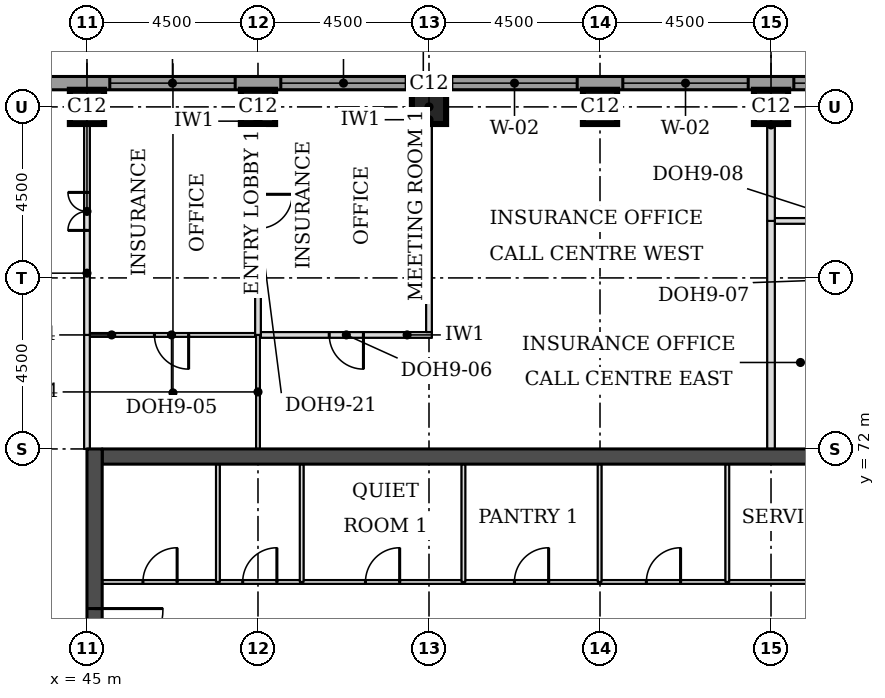
"""IFC4 building model, lengths in metres.
Left out: names, types, materials, properties, quantities, classifications, styles, units other than length and angle.
Written with IfcOpenShell. Run it as: python <this file> out.ifc"""

import sys

from ifc_helpers import new_model, si_unit, direction, frame, frame_2d, origin, origin_2d, place, context, subcontext, project, spatial, rectangle, extrude, element, fill, save


model = new_model("IFC4")
c1 = context("Model", 3, precision=1e-05, world=origin(), true_north=direction((0.0, 1.0)))
c2 = subcontext(c1, "Body", "Model", "MODEL_VIEW")
j1 = project(units=[si_unit("LENGTHUNIT", "METRE"), si_unit("PLANEANGLEUNIT", "RADIAN")], contexts=[c1])
p1 = place(None, origin())
s1 = spatial("IfcSite", under=j1, at=p1, CompositionType="ELEMENT")
p2 = place(p1, origin())
s2 = spatial("IfcBuilding", under=s1, at=p2, CompositionType="ELEMENT")
p3 = place(p2, frame((0.0, 0.0, 211.9)))
s3 = spatial("IfcBuildingStorey", under=s2, at=p3, CompositionType="ELEMENT", Elevation=211.9)
for number, where, z_axis, x_axis in (
    (1, (45.0, 81.0, 0.0), (0.0, 0.0, 1.0), (1.0, 0.0, 0.0)),
    (2, (49.5, 81.0, 0.0), (0.0, 0.0, 1.0), (1.0, 0.0, 0.0)),
    (3, (54.0, 81.0, 0.0), (0.0, 0.0, 1.0), (1.0, 0.0, 0.0)),
    (4, (58.5, 81.0, 0.0), (0.0, 0.0, 1.0), (1.0, 0.0, 0.0)),
    (5, (63.0, 81.0, 0.0), (0.0, 0.0, 1.0), (1.0, 0.0, 0.0)),
):
    element("IfcColumn", number, at=place(p3, frame(where, z_axis=z_axis, x_axis=x_axis)), inside=s3, PredefinedType="COLUMN", context=c2, shape_type="SweptSolid", body=[
        extrude(rectangle(XDim=0.9, YDim=0.9, at=origin_2d()), origin(), (0.0, 0.0, 1.0), 3.7),
    ])
p4 = place(p3, frame((45.4, 71.8, 0.0), z_axis=(0.0, 0.0, 1.0), x_axis=(1.0, 0.0, 0.0)))
e6 = element("IfcWall", 6, at=p4, inside=s3, PredefinedType="SHEAR", context=c2, shape_type="SweptSolid", body=[
    extrude(rectangle(XDim=21.7, YDim=0.4, at=frame_2d((10.85, 0.0))), origin(), (0.0, 0.0, 1.0), 3.7),
])
p5 = place(p3, frame((45.2, 49.5, 0.0), z_axis=(0.0, 0.0, 1.0), x_axis=(0.0, 1.0, 0.0)))
e7 = element("IfcWall", 7, at=p5, inside=s3, PredefinedType="SHEAR", context=c2, shape_type="SweptSolid", body=[
    extrude(rectangle(XDim=22.5, YDim=0.4, at=frame_2d((11.25, 0.0))), origin(), (0.0, 0.0, 1.0), 3.7),
])
p6 = place(p5, frame((4.2, 0.0, 0.0)))
e8 = element("IfcOpeningElement", 8, at=p6, cuts=e7, PredefinedType="OPENING", context=c2, shape_type="SweptSolid", body=[
    extrude(rectangle(XDim=1.8, YDim=2.1, at=frame_2d((0.9, 1.05))), frame((0.0, 0.21, 0.0), z_axis=(0.0, -1.0, 0.0), x_axis=(1.0, 0.0, 0.0)), (0.0, 0.0, 1.0), 0.42),
])
p7 = place(p5, frame((6.9, 0.0, 0.0)))
e9 = element("IfcOpeningElement", 9, at=p7, cuts=e7, PredefinedType="OPENING", context=c2, shape_type="SweptSolid", body=[
    extrude(rectangle(XDim=1.1, YDim=2.1, at=frame_2d((0.55, 1.05))), frame((0.0, 0.21, 0.0), z_axis=(0.0, -1.0, 0.0), x_axis=(1.0, 0.0, 0.0)), (0.0, 0.0, 1.0), 0.42),
])
p8 = place(p5, frame((13.6, 0.0, 0.0)))
e10 = element("IfcOpeningElement", 10, at=p8, cuts=e7, PredefinedType="OPENING", context=c2, shape_type="SweptSolid", body=[
    extrude(rectangle(XDim=1.1, YDim=2.1, at=frame_2d((0.55, 1.05))), frame((0.0, 0.21, 0.0), z_axis=(0.0, -1.0, 0.0), x_axis=(1.0, 0.0, 0.0)), (0.0, 0.0, 1.0), 0.42),
])
p9 = place(p5, frame((16.5, 0.0, 0.0)))
e11 = element("IfcOpeningElement", 11, at=p9, cuts=e7, PredefinedType="OPENING", context=c2, shape_type="SweptSolid", body=[
    extrude(rectangle(XDim=1.8, YDim=2.1, at=frame_2d((0.9, 1.05))), frame((0.0, 0.21, 0.0), z_axis=(0.0, -1.0, 0.0), x_axis=(1.0, 0.0, 0.0)), (0.0, 0.0, 1.0), 0.42),
])
p10 = place(p3, frame((72.331, 81.625, 0.0), z_axis=(0.0, 0.0, 1.0), x_axis=(-1.0, 0.0, 0.0)))
e12 = element("IfcWall", 12, at=p10, inside=s3, PredefinedType="STANDARD", context=c2, shape_type="SweptSolid", body=[
    extrude(rectangle(XDim=32.163, YDim=0.35, at=frame_2d((16.081, 0.0))), origin(), (0.0, 0.0, 1.0), 3.525),
])
p11 = place(p10, frame((5.431, 0.0, 0.9)))
e13 = element("IfcOpeningElement", 13, at=p11, cuts=e12, PredefinedType="OPENING", context=c2, shape_type="SweptSolid", body=[
    extrude(rectangle(XDim=3.3, YDim=1.9, at=frame_2d((1.65, 0.95))), frame((0.0, 0.185, 0.0), z_axis=(0.0, -1.0, 0.0), x_axis=(1.0, 0.0, 0.0)), (0.0, 0.0, 1.0), 0.37),
])
p12 = place(p10, frame((9.931, 0.0, 0.9)))
e14 = element("IfcOpeningElement", 14, at=p12, cuts=e12, PredefinedType="OPENING", context=c2, shape_type="SweptSolid", body=[
    extrude(rectangle(XDim=3.3, YDim=1.9, at=frame_2d((1.65, 0.95))), frame((0.0, 0.185, 0.0), z_axis=(0.0, -1.0, 0.0), x_axis=(1.0, 0.0, 0.0)), (0.0, 0.0, 1.0), 0.37),
])
p13 = place(p10, frame((14.431, 0.0, 0.9)))
e15 = element("IfcOpeningElement", 15, at=p13, cuts=e12, PredefinedType="OPENING", context=c2, shape_type="SweptSolid", body=[
    extrude(rectangle(XDim=3.3, YDim=1.9, at=frame_2d((1.65, 0.95))), frame((0.0, 0.185, 0.0), z_axis=(0.0, -1.0, 0.0), x_axis=(1.0, 0.0, 0.0)), (0.0, 0.0, 1.0), 0.37),
])
p14 = place(p10, frame((18.931, 0.0, 0.9)))
e16 = element("IfcOpeningElement", 16, at=p14, cuts=e12, PredefinedType="OPENING", context=c2, shape_type="SweptSolid", body=[
    extrude(rectangle(XDim=3.3, YDim=1.9, at=frame_2d((1.65, 0.95))), frame((0.0, 0.185, 0.0), z_axis=(0.0, -1.0, 0.0), x_axis=(1.0, 0.0, 0.0)), (0.0, 0.0, 1.0), 0.37),
])
p15 = place(p10, frame((23.431, 0.0, 0.9)))
e17 = element("IfcOpeningElement", 17, at=p15, cuts=e12, PredefinedType="OPENING", context=c2, shape_type="SweptSolid", body=[
    extrude(rectangle(XDim=3.3, YDim=1.9, at=frame_2d((1.65, 0.95))), frame((0.0, 0.185, 0.0), z_axis=(0.0, -1.0, 0.0), x_axis=(1.0, 0.0, 0.0)), (0.0, 0.0, 1.0), 0.37),
])
p16 = place(p3, frame((45.075, 75.0, 0.0), z_axis=(0.0, 0.0, 1.0), x_axis=(1.0, 0.0, 0.0)))
e18 = element("IfcWall", 18, at=p16, inside=s3, PredefinedType="PARTITIONING", context=c2, shape_type="SweptSolid", body=[
    extrude(rectangle(XDim=4.35, YDim=0.1, at=frame_2d((2.175, 0.0))), origin(), (0.0, 0.0, 1.0), 3.55),
])
p17 = place(p16, frame((1.7, 0.0, 0.0)))
e19 = element("IfcOpeningElement", 19, at=p17, cuts=e18, PredefinedType="OPENING", context=c2, shape_type="SweptSolid", body=[
    extrude(rectangle(XDim=0.9, YDim=2.1, at=frame_2d((0.45, 1.05))), frame((0.0, 0.06, 0.0), z_axis=(0.0, -1.0, 0.0), x_axis=(1.0, 0.0, 0.0)), (0.0, 0.0, 1.0), 0.12),
])
p18 = place(p3, frame((49.575, 75.0, 0.0), z_axis=(0.0, 0.0, 1.0), x_axis=(1.0, 0.0, 0.0)))
e20 = element("IfcWall", 20, at=p18, inside=s3, PredefinedType="PARTITIONING", context=c2, shape_type="SweptSolid", body=[
    extrude(rectangle(XDim=4.5, YDim=0.15, at=frame_2d((2.25, 0.0))), origin(), (0.0, 0.0, 1.0), 3.55),
])
p19 = place(p18, frame((1.8, 0.0, 0.0)))
e21 = element("IfcOpeningElement", 21, at=p19, cuts=e20, PredefinedType="OPENING", context=c2, shape_type="SweptSolid", body=[
    extrude(rectangle(XDim=0.9, YDim=2.1, at=frame_2d((0.45, 1.05))), frame((0.0, 0.085, 0.0), z_axis=(0.0, -1.0, 0.0), x_axis=(1.0, 0.0, 0.0)), (0.0, 0.0, 1.0), 0.17),
])
p20 = place(p3, frame((63.1, 78.0, 0.0), z_axis=(0.0, 0.0, 1.0), x_axis=(1.0, 0.0, 0.0)))
e22 = element("IfcWall", 22, at=p20, inside=s3, PredefinedType="PARTITIONING", context=c2, shape_type="SweptSolid", body=[
    extrude(rectangle(XDim=4.325, YDim=0.15, at=frame_2d((2.163, 0.0))), origin(), (0.0, 0.0, 1.0), 3.55),
])
p21 = place(p20, frame((1.45, 0.0, 0.0)))
e23 = element("IfcOpeningElement", 23, at=p21, cuts=e22, PredefinedType="OPENING", context=c2, shape_type="SweptSolid", body=[
    extrude(rectangle(XDim=0.9, YDim=2.1, at=frame_2d((0.45, 1.05))), frame((0.0, 0.085, 0.0), z_axis=(0.0, -1.0, 0.0), x_axis=(1.0, 0.0, 0.0)), (0.0, 0.0, 1.0), 0.17),
])
p22 = place(p3, frame((45.0, 72.0, 0.0), z_axis=(0.0, 0.0, 1.0), x_axis=(0.0, 1.0, 0.0)))
e24 = element("IfcWall", 24, at=p22, inside=s3, PredefinedType="PARTITIONING", context=c2, shape_type="SweptSolid", body=[
    extrude(rectangle(XDim=3.0, YDim=0.15, at=frame_2d((1.5, 0.0))), origin(), (0.0, 0.0, 1.0), 3.022),
])
p23 = place(p3, frame((49.5, 72.0, 0.0), z_axis=(0.0, 0.0, 1.0), x_axis=(0.0, 1.0, 0.0)))
e25 = element("IfcWall", 25, at=p23, inside=s3, PredefinedType="PARTITIONING", context=c2, shape_type="SweptSolid", body=[
    extrude(rectangle(XDim=3.0, YDim=0.1, at=frame_2d((1.5, 0.0))), origin(), (0.0, 0.0, 1.0), 3.55),
])
p24 = place(p3, frame((63.0, 72.0, 0.0), z_axis=(0.0, 0.0, 1.0), x_axis=(0.0, 1.0, 0.0)))
e26 = element("IfcWall", 26, at=p24, inside=s3, PredefinedType="PARTITIONING", context=c2, shape_type="SweptSolid", body=[
    extrude(rectangle(XDim=6.0, YDim=0.2, at=frame_2d((3.0, 0.0))), origin(), (0.0, 0.0, 1.0), 3.55),
])
p25 = place(p3, frame((45.0, 75.0, 0.0), z_axis=(0.0, 0.0, 1.0), x_axis=(0.0, 1.0, 0.0)))
e27 = element("IfcWall", 27, at=p25, inside=s3, PredefinedType="PARTITIONING", context=c2, shape_type="SweptSolid", body=[
    extrude(rectangle(XDim=6.45, YDim=0.15, at=frame_2d((3.225, 0.0))), origin(), (0.0, 0.0, 1.0), 3.022),
])
p26 = place(p25, frame((2.75, 0.0, 0.0)))
e28 = element("IfcOpeningElement", 28, at=p26, cuts=e27, PredefinedType="OPENING", context=c2, shape_type="SweptSolid", body=[
    extrude(rectangle(XDim=1.0, YDim=2.1, at=frame_2d((0.5, 1.05))), frame((0.0, 0.085, 0.0), z_axis=(0.0, -1.0, 0.0), x_axis=(1.0, 0.0, 0.0)), (0.0, 0.0, 1.0), 0.17),
])
p27 = place(p3, frame((49.5, 75.0, 0.0), z_axis=(0.0, 0.0, 1.0), x_axis=(0.0, 1.0, 0.0)))
e29 = element("IfcWall", 29, at=p27, inside=s3, PredefinedType="PARTITIONING", context=c2, shape_type="SweptSolid", body=[
    extrude(rectangle(XDim=6.45, YDim=0.15, at=frame_2d((3.225, 0.0))), origin(), (0.0, 0.0, 1.0), 3.55),
])
p28 = place(p27, frame((2.8, 0.0, 0.0)))
e30 = element("IfcOpeningElement", 30, at=p28, cuts=e29, PredefinedType="OPENING", context=c2, shape_type="SweptSolid", body=[
    extrude(rectangle(XDim=0.9, YDim=2.1, at=frame_2d((0.45, 1.05))), frame((0.0, 0.085, 0.0), z_axis=(0.0, -1.0, 0.0), x_axis=(1.0, 0.0, 0.0)), (0.0, 0.0, 1.0), 0.17),
])
p29 = place(p3, frame((54.0, 75.075, 0.0), z_axis=(0.0, 0.0, 1.0), x_axis=(0.0, 1.0, 0.0)))
e31 = element("IfcWall", 31, at=p29, inside=s3, PredefinedType="PARTITIONING", context=c2, shape_type="SweptSolid", body=[
    extrude(rectangle(XDim=6.375, YDim=0.15, at=frame_2d((3.188, 0.0))), origin(), (0.0, 0.0, 1.0), 3.55),
])
p30 = place(p3, frame((63.0, 78.0, 0.0), z_axis=(0.0, 0.0, 1.0), x_axis=(0.0, 1.0, 0.0)))
e32 = element("IfcWall", 32, at=p30, inside=s3, PredefinedType="PARTITIONING", context=c2, shape_type="SweptSolid", body=[
    extrude(rectangle(XDim=3.45, YDim=0.2, at=frame_2d((1.725, 0.0))), origin(), (0.0, 0.0, 1.0), 3.55),
])
p31 = place(p3, frame((45.4, 68.5, 0.0), z_axis=(0.0, 0.0, 1.0), x_axis=(1.0, 0.0, 0.0)))
e33 = element("IfcWall", 33, at=p31, inside=s3, PredefinedType="PARTITIONING", context=c2, shape_type="SweptSolid", body=[
    extrude(rectangle(XDim=21.7, YDim=0.1, at=frame_2d((10.85, 0.0))), origin(), (0.0, 0.0, 1.0), 3.55),
])
p32 = place(p31, frame((18.625, 0.0, 0.0)))
e34 = element("IfcOpeningElement", 34, at=p32, cuts=e33, PredefinedType="OPENING", context=c2, shape_type="SweptSolid", body=[
    extrude(rectangle(XDim=0.9, YDim=2.1, at=frame_2d((0.45, 1.05))), frame((0.0, 0.06, 0.0), z_axis=(0.0, -1.0, 0.0), x_axis=(1.0, 0.0, 0.0)), (0.0, 0.0, 1.0), 0.12),
])
p33 = place(p31, frame((1.073, 0.0, 0.0)))
e35 = element("IfcOpeningElement", 35, at=p33, cuts=e33, PredefinedType="OPENING", context=c2, shape_type="SweptSolid", body=[
    extrude(rectangle(XDim=0.9, YDim=2.1, at=frame_2d((0.45, 1.05))), frame((0.0, 0.06, 0.0), z_axis=(0.0, -1.0, 0.0), x_axis=(1.0, 0.0, 0.0)), (0.0, 0.0, 1.0), 0.12),
])
p34 = place(p31, frame((3.698, 0.0, 0.0)))
e36 = element("IfcOpeningElement", 36, at=p34, cuts=e33, PredefinedType="OPENING", context=c2, shape_type="SweptSolid", body=[
    extrude(rectangle(XDim=0.9, YDim=2.1, at=frame_2d((0.45, 1.05))), frame((0.0, 0.06, 0.0), z_axis=(0.0, -1.0, 0.0), x_axis=(1.0, 0.0, 0.0)), (0.0, 0.0, 1.0), 0.12),
])
p35 = place(p31, frame((14.32, 0.0, 0.0)))
e37 = element("IfcOpeningElement", 37, at=p35, cuts=e33, PredefinedType="OPENING", context=c2, shape_type="SweptSolid", body=[
    extrude(rectangle(XDim=0.9, YDim=2.1, at=frame_2d((0.45, 1.05))), frame((0.0, 0.06, 0.0), z_axis=(0.0, -1.0, 0.0), x_axis=(1.0, 0.0, 0.0)), (0.0, 0.0, 1.0), 0.12),
])
p36 = place(p31, frame((10.848, 0.0, 0.0)))
e38 = element("IfcOpeningElement", 38, at=p36, cuts=e33, PredefinedType="OPENING", context=c2, shape_type="SweptSolid", body=[
    extrude(rectangle(XDim=0.9, YDim=2.1, at=frame_2d((0.45, 1.05))), frame((0.0, 0.06, 0.0), z_axis=(0.0, -1.0, 0.0), x_axis=(1.0, 0.0, 0.0)), (0.0, 0.0, 1.0), 0.12),
])
p37 = place(p31, frame((6.928, 0.0, 0.0)))
e39 = element("IfcOpeningElement", 39, at=p37, cuts=e33, PredefinedType="OPENING", context=c2, shape_type="SweptSolid", body=[
    extrude(rectangle(XDim=0.9, YDim=2.1, at=frame_2d((0.45, 1.05))), frame((0.0, 0.06, 0.0), z_axis=(0.0, -1.0, 0.0), x_axis=(1.0, 0.0, 0.0)), (0.0, 0.0, 1.0), 0.12),
])
for number, where, z_axis, x_axis in (
    (40, (48.445, 68.5, 0.0), (0.0, 0.0, 1.0), (0.0, 1.0, 0.0)),
    (41, (50.65, 68.5, 0.0), (0.0, 0.0, 1.0), (0.0, 1.0, 0.0)),
    (42, (54.906, 68.5, 0.0), (0.0, 0.0, 1.0), (0.0, 1.0, 0.0)),
    (43, (58.49, 68.5, 0.0), (0.0, 0.0, 1.0), (0.0, 1.0, 0.0)),
    (44, (61.85, 68.5, 0.0), (0.0, 0.0, 1.0), (0.0, 1.0, 0.0)),
):
    element("IfcWall", number, at=place(p3, frame(where, z_axis=z_axis, x_axis=x_axis)), inside=s3, PredefinedType="PARTITIONING", context=c2, shape_type="SweptSolid", body=[
        extrude(rectangle(XDim=3.1, YDim=0.1, at=frame_2d((1.55, 0.0))), origin(), (0.0, 0.0, 1.0), 3.55),
    ])
p38 = place(p11, origin())
e45 = element("IfcWindow", 45, at=p38, inside=s3, PartitioningType="SINGLE_PANEL", PredefinedType="WINDOW", context=c2, shape_type="SweptSolid", body=[
    extrude(rectangle(XDim=3.3, YDim=1.9, at=frame_2d((1.65, 0.95))), frame((0.0, 0.085, 0.0), z_axis=(0.0, -1.0, 0.0), x_axis=(1.0, 0.0, 0.0)), (0.0, 0.0, 1.0), 0.06),
])
fill(e13, e45)
p39 = place(p12, origin())
e46 = element("IfcWindow", 46, at=p39, inside=s3, PartitioningType="SINGLE_PANEL", PredefinedType="WINDOW", context=c2, shape_type="SweptSolid", body=[
    extrude(rectangle(XDim=3.3, YDim=1.9, at=frame_2d((1.65, 0.95))), frame((0.0, 0.085, 0.0), z_axis=(0.0, -1.0, 0.0), x_axis=(1.0, 0.0, 0.0)), (0.0, 0.0, 1.0), 0.06),
])
fill(e14, e46)
p40 = place(p13, origin())
e47 = element("IfcWindow", 47, at=p40, inside=s3, PartitioningType="SINGLE_PANEL", PredefinedType="WINDOW", context=c2, shape_type="SweptSolid", body=[
    extrude(rectangle(XDim=3.3, YDim=1.9, at=frame_2d((1.65, 0.95))), frame((0.0, 0.085, 0.0), z_axis=(0.0, -1.0, 0.0), x_axis=(1.0, 0.0, 0.0)), (0.0, 0.0, 1.0), 0.06),
])
fill(e15, e47)
p41 = place(p14, origin())
e48 = element("IfcWindow", 48, at=p41, inside=s3, PartitioningType="SINGLE_PANEL", PredefinedType="WINDOW", context=c2, shape_type="SweptSolid", body=[
    extrude(rectangle(XDim=3.3, YDim=1.9, at=frame_2d((1.65, 0.95))), frame((0.0, 0.085, 0.0), z_axis=(0.0, -1.0, 0.0), x_axis=(1.0, 0.0, 0.0)), (0.0, 0.0, 1.0), 0.06),
])
fill(e16, e48)
p42 = place(p15, origin())
e49 = element("IfcWindow", 49, at=p42, inside=s3, PartitioningType="SINGLE_PANEL", PredefinedType="WINDOW", context=c2, shape_type="SweptSolid", body=[
    extrude(rectangle(XDim=3.3, YDim=1.9, at=frame_2d((1.65, 0.95))), frame((0.0, 0.085, 0.0), z_axis=(0.0, -1.0, 0.0), x_axis=(1.0, 0.0, 0.0)), (0.0, 0.0, 1.0), 0.06),
])
fill(e17, e49)
p43 = place(p26, origin())
e50 = element("IfcDoor", 50, at=p43, inside=s3, OperationType="DOUBLE_DOOR_SINGLE_SWING", PredefinedType="DOOR", context=c2, shape_type="SweptSolid", body=[
    extrude(rectangle(XDim=1.0, YDim=2.1, at=frame_2d((0.5, 1.05))), frame((0.0, 0.025, 0.0), z_axis=(0.0, -1.0, 0.0), x_axis=(1.0, 0.0, 0.0)), (0.0, 0.0, 1.0), 0.05),
])
fill(e28, e50)
p44 = place(p28, frame((0.9, 0.0, 0.0), z_axis=(0.0, 0.0, 1.0), x_axis=(-1.0, 0.0, 0.0)))
e51 = element("IfcDoor", 51, at=p44, inside=s3, OperationType="SINGLE_SWING_LEFT", PredefinedType="DOOR", context=c2, shape_type="SweptSolid", body=[
    extrude(rectangle(XDim=0.9, YDim=2.1, at=frame_2d((0.45, 1.05))), frame((0.0, 0.025, 0.0), z_axis=(0.0, -1.0, 0.0), x_axis=(1.0, 0.0, 0.0)), (0.0, 0.0, 1.0), 0.05),
])
fill(e30, e51)
p45 = place(p17, frame((0.9, 0.0, 0.0), z_axis=(0.0, 0.0, 1.0), x_axis=(-1.0, 0.0, 0.0)))
e52 = element("IfcDoor", 52, at=p45, inside=s3, OperationType="SINGLE_SWING_LEFT", PredefinedType="DOOR", context=c2, shape_type="SweptSolid", body=[
    extrude(rectangle(XDim=0.9, YDim=2.1, at=frame_2d((0.45, 1.05))), frame((0.0, 0.025, 0.0), z_axis=(0.0, -1.0, 0.0), x_axis=(1.0, 0.0, 0.0)), (0.0, 0.0, 1.0), 0.05),
])
fill(e19, e52)
p46 = place(p19, frame((0.9, 0.0, 0.0), z_axis=(0.0, 0.0, 1.0), x_axis=(-1.0, 0.0, 0.0)))
e53 = element("IfcDoor", 53, at=p46, inside=s3, OperationType="SINGLE_SWING_LEFT", PredefinedType="DOOR", context=c2, shape_type="SweptSolid", body=[
    extrude(rectangle(XDim=0.9, YDim=2.1, at=frame_2d((0.45, 1.05))), frame((0.0, 0.025, 0.0), z_axis=(0.0, -1.0, 0.0), x_axis=(1.0, 0.0, 0.0)), (0.0, 0.0, 1.0), 0.05),
])
fill(e21, e53)
p47 = place(p9, frame((1.8, 0.0, 0.0), z_axis=(0.0, 0.0, 1.0), x_axis=(-1.0, 0.0, 0.0)))
e54 = element("IfcDoor", 54, at=p47, inside=s3, OperationType="SINGLE_SWING_LEFT", PredefinedType="DOOR", context=c2, shape_type="SweptSolid", body=[
    extrude(rectangle(XDim=1.8, YDim=2.1, at=frame_2d((0.9, 1.05))), frame((0.0, 0.025, 0.0), z_axis=(0.0, -1.0, 0.0), x_axis=(1.0, 0.0, 0.0)), (0.0, 0.0, 1.0), 0.05),
])
fill(e11, e54)
p48 = place(p33, origin())
e55 = element("IfcDoor", 55, at=p48, inside=s3, OperationType="SINGLE_SWING_RIGHT", PredefinedType="DOOR", context=c2, shape_type="SweptSolid", body=[
    extrude(rectangle(XDim=0.9, YDim=2.1, at=frame_2d((0.45, 1.05))), frame((0.0, 0.025, 0.0), z_axis=(0.0, -1.0, 0.0), x_axis=(1.0, 0.0, 0.0)), (0.0, 0.0, 1.0), 0.05),
])
fill(e35, e55)
p49 = place(p34, origin())
e56 = element("IfcDoor", 56, at=p49, inside=s3, OperationType="SINGLE_SWING_RIGHT", PredefinedType="DOOR", context=c2, shape_type="SweptSolid", body=[
    extrude(rectangle(XDim=0.9, YDim=2.1, at=frame_2d((0.45, 1.05))), frame((0.0, 0.025, 0.0), z_axis=(0.0, -1.0, 0.0), x_axis=(1.0, 0.0, 0.0)), (0.0, 0.0, 1.0), 0.05),
])
fill(e36, e56)
p50 = place(p35, origin())
e57 = element("IfcDoor", 57, at=p50, inside=s3, OperationType="SINGLE_SWING_RIGHT", PredefinedType="DOOR", context=c2, shape_type="SweptSolid", body=[
    extrude(rectangle(XDim=0.9, YDim=2.1, at=frame_2d((0.45, 1.05))), frame((0.0, 0.025, 0.0), z_axis=(0.0, -1.0, 0.0), x_axis=(1.0, 0.0, 0.0)), (0.0, 0.0, 1.0), 0.05),
])
fill(e37, e57)
p51 = place(p36, origin())
e58 = element("IfcDoor", 58, at=p51, inside=s3, OperationType="SINGLE_SWING_RIGHT", PredefinedType="DOOR", context=c2, shape_type="SweptSolid", body=[
    extrude(rectangle(XDim=0.9, YDim=2.1, at=frame_2d((0.45, 1.05))), frame((0.0, 0.025, 0.0), z_axis=(0.0, -1.0, 0.0), x_axis=(1.0, 0.0, 0.0)), (0.0, 0.0, 1.0), 0.05),
])
fill(e38, e58)
p52 = place(p37, origin())
e59 = element("IfcDoor", 59, at=p52, inside=s3, OperationType="SINGLE_SWING_RIGHT", PredefinedType="DOOR", context=c2, shape_type="SweptSolid", body=[
    extrude(rectangle(XDim=0.9, YDim=2.1, at=frame_2d((0.45, 1.05))), frame((0.0, 0.025, 0.0), z_axis=(0.0, -1.0, 0.0), x_axis=(1.0, 0.0, 0.0)), (0.0, 0.0, 1.0), 0.05),
])
fill(e39, e59)
save(model, sys.argv[1])
